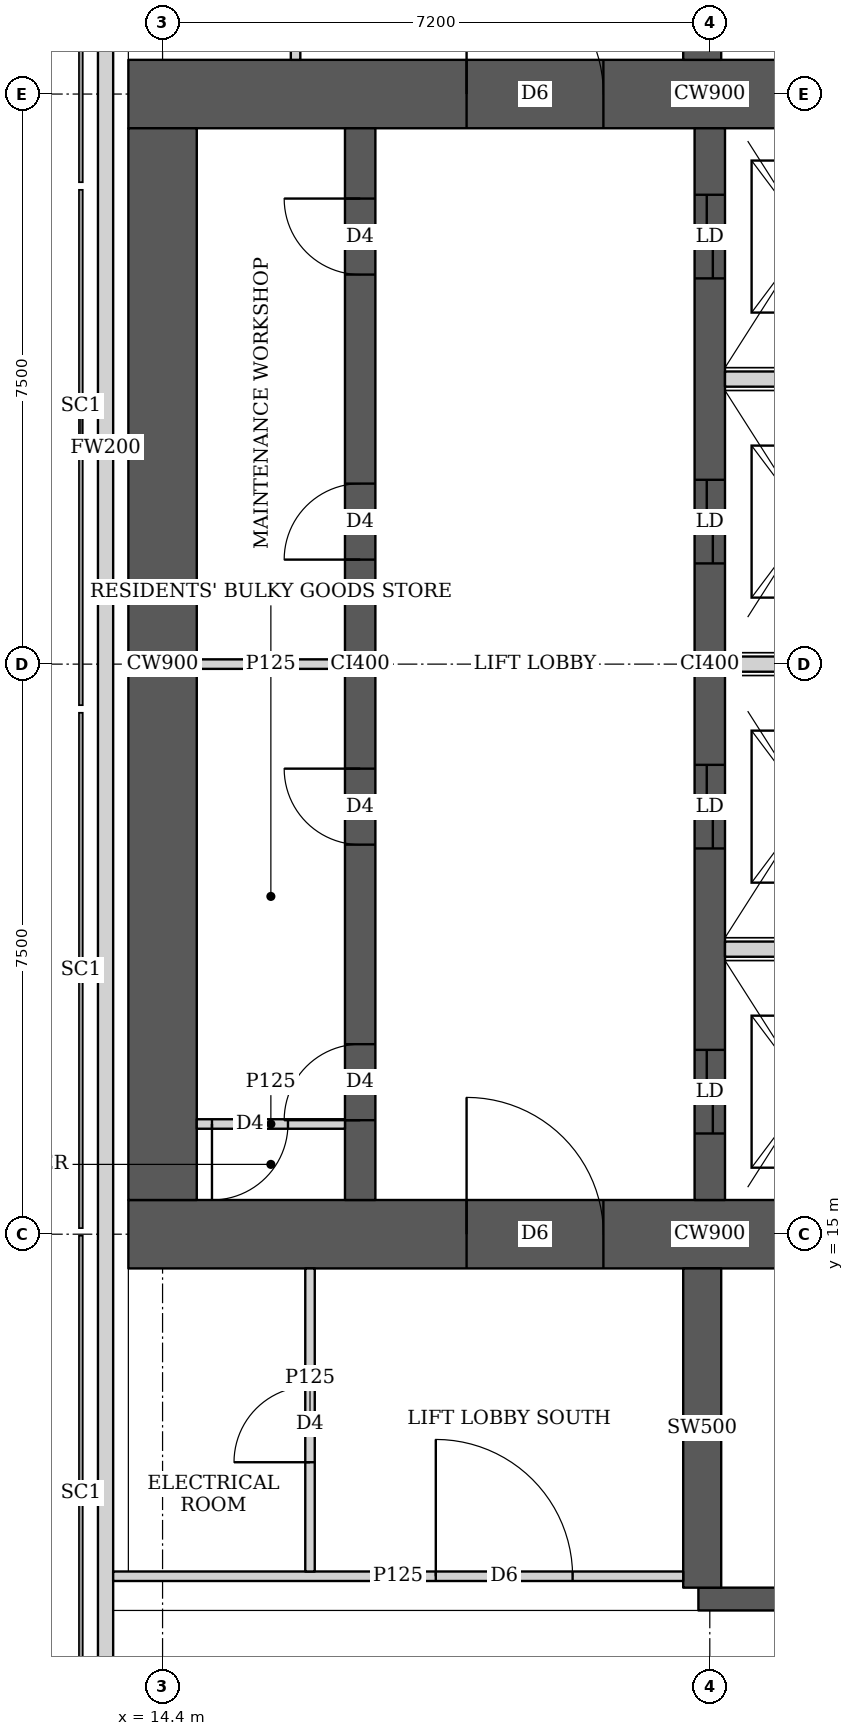
"""IFC4 building model, lengths in metres.
Left out: names, types, materials, properties, quantities, classifications, styles, units other than length and angle.
Written with IfcOpenShell. Run it as: python <this file> out.ifc"""

import sys

from ifc_helpers import new_model, si_unit, direction, frame, frame_2d, origin, place, context, subcontext, project, spatial, rectangle, extrude, element, fill, save


model = new_model("IFC4")
c1 = context("Model", 3, precision=1e-05, world=origin(), true_north=direction((0.0, 1.0)))
c2 = subcontext(c1, "Body", "Model", "MODEL_VIEW")
j1 = project(units=[si_unit("LENGTHUNIT", "METRE"), si_unit("PLANEANGLEUNIT", "RADIAN")], contexts=[c1])
p1 = place(None, origin())
s1 = spatial("IfcSite", under=j1, at=p1, CompositionType="ELEMENT")
p2 = place(p1, origin())
s2 = spatial("IfcBuilding", under=s1, at=p2, CompositionType="ELEMENT")
p3 = place(p2, frame((0.0, 0.0, 277.85)))
s3 = spatial("IfcBuildingStorey", under=s2, at=p3, CompositionType="ELEMENT", Elevation=277.85)
p4 = place(p3, frame((13.95, 15.0, 0.0), z_axis=(0.0, 0.0, 1.0), x_axis=(1.0, 0.0, 0.0)))
e1 = element("IfcWall", 1, at=p4, inside=s3, PredefinedType="SHEAR", context=c2, shape_type="SweptSolid", body=[
    extrude(rectangle(XDim=15.3, YDim=0.9, at=frame_2d((7.65, 0.0))), origin(), (0.0, 0.0, 1.0), 3.75),
])
p5 = place(p4, frame((4.45, 0.0, 0.0)))
e2 = element("IfcOpeningElement", 2, at=p5, cuts=e1, PredefinedType="OPENING", context=c2, shape_type="SweptSolid", body=[
    extrude(rectangle(XDim=1.8, YDim=2.1, at=frame_2d((0.9, 1.05))), frame((0.0, 0.46, 0.0), z_axis=(0.0, -1.0, 0.0), x_axis=(1.0, 0.0, 0.0)), (0.0, 0.0, 1.0), 0.92),
])
p6 = place(p4, frame((10.7, 0.0, 0.0)))
e3 = element("IfcOpeningElement", 3, at=p6, cuts=e1, PredefinedType="OPENING", context=c2, shape_type="SweptSolid", body=[
    extrude(rectangle(XDim=1.1, YDim=2.1, at=frame_2d((0.55, 1.05))), frame((0.0, 0.46, 0.0), z_axis=(0.0, -1.0, 0.0), x_axis=(1.0, 0.0, 0.0)), (0.0, 0.0, 1.0), 0.92),
])
p7 = place(p3, frame((13.95, 30.0, 0.0), z_axis=(0.0, 0.0, 1.0), x_axis=(1.0, 0.0, 0.0)))
e4 = element("IfcWall", 4, at=p7, inside=s3, PredefinedType="SHEAR", context=c2, shape_type="SweptSolid", body=[
    extrude(rectangle(XDim=15.3, YDim=0.9, at=frame_2d((7.65, 0.0))), origin(), (0.0, 0.0, 1.0), 3.75),
])
p8 = place(p7, frame((4.45, 0.0, 0.0)))
e5 = element("IfcOpeningElement", 5, at=p8, cuts=e4, PredefinedType="OPENING", context=c2, shape_type="SweptSolid", body=[
    extrude(rectangle(XDim=1.8, YDim=2.1, at=frame_2d((0.9, 1.05))), frame((0.0, 0.46, 0.0), z_axis=(0.0, -1.0, 0.0), x_axis=(1.0, 0.0, 0.0)), (0.0, 0.0, 1.0), 0.92),
])
p9 = place(p7, frame((10.7, 0.0, 0.0)))
e6 = element("IfcOpeningElement", 6, at=p9, cuts=e4, PredefinedType="OPENING", context=c2, shape_type="SweptSolid", body=[
    extrude(rectangle(XDim=1.1, YDim=2.1, at=frame_2d((0.55, 1.05))), frame((0.0, 0.46, 0.0), z_axis=(0.0, -1.0, 0.0), x_axis=(1.0, 0.0, 0.0)), (0.0, 0.0, 1.0), 0.92),
])
p10 = place(p3, frame((14.4, 15.45, 0.0), z_axis=(0.0, 0.0, 1.0), x_axis=(0.0, 1.0, 0.0)))
e7 = element("IfcWall", 7, at=p10, inside=s3, PredefinedType="SHEAR", context=c2, shape_type="SweptSolid", body=[
    extrude(rectangle(XDim=14.1, YDim=0.9, at=frame_2d((7.05, 0.0))), origin(), (0.0, 0.0, 1.0), 3.75),
])
p11 = place(p3, frame((17.0, 15.45, 0.0), z_axis=(0.0, 0.0, 1.0), x_axis=(0.0, 1.0, 0.0)))
e8 = element("IfcWall", 8, at=p11, inside=s3, PredefinedType="SHEAR", context=c2, shape_type="SweptSolid", body=[
    extrude(rectangle(XDim=14.1, YDim=0.4, at=frame_2d((7.05, 0.0))), origin(), (0.0, 0.0, 1.0), 3.75),
])
p12 = place(p11, frame((1.05, 0.0, 0.0)))
e9 = element("IfcOpeningElement", 9, at=p12, cuts=e8, PredefinedType="OPENING", context=c2, shape_type="SweptSolid", body=[
    extrude(rectangle(XDim=1.0, YDim=2.1, at=frame_2d((0.5, 1.05))), frame((0.0, 0.21, 0.0), z_axis=(0.0, -1.0, 0.0), x_axis=(1.0, 0.0, 0.0)), (0.0, 0.0, 1.0), 0.42),
])
p13 = place(p11, frame((4.675, 0.0, 0.0)))
e10 = element("IfcOpeningElement", 10, at=p13, cuts=e8, PredefinedType="OPENING", context=c2, shape_type="SweptSolid", body=[
    extrude(rectangle(XDim=1.0, YDim=2.1, at=frame_2d((0.5, 1.05))), frame((0.0, 0.21, 0.0), z_axis=(0.0, -1.0, 0.0), x_axis=(1.0, 0.0, 0.0)), (0.0, 0.0, 1.0), 0.42),
])
p14 = place(p11, frame((8.425, 0.0, 0.0)))
e11 = element("IfcOpeningElement", 11, at=p14, cuts=e8, PredefinedType="OPENING", context=c2, shape_type="SweptSolid", body=[
    extrude(rectangle(XDim=1.0, YDim=2.1, at=frame_2d((0.5, 1.05))), frame((0.0, 0.21, 0.0), z_axis=(0.0, -1.0, 0.0), x_axis=(1.0, 0.0, 0.0)), (0.0, 0.0, 1.0), 0.42),
])
p15 = place(p11, frame((12.175, 0.0, 0.0)))
e12 = element("IfcOpeningElement", 12, at=p15, cuts=e8, PredefinedType="OPENING", context=c2, shape_type="SweptSolid", body=[
    extrude(rectangle(XDim=1.0, YDim=2.1, at=frame_2d((0.5, 1.05))), frame((0.0, 0.21, 0.0), z_axis=(0.0, -1.0, 0.0), x_axis=(1.0, 0.0, 0.0)), (0.0, 0.0, 1.0), 0.42),
])
p16 = place(p3, frame((21.6, 15.45, 0.0), z_axis=(0.0, 0.0, 1.0), x_axis=(0.0, 1.0, 0.0)))
e13 = element("IfcWall", 13, at=p16, inside=s3, PredefinedType="SHEAR", context=c2, shape_type="SweptSolid", body=[
    extrude(rectangle(XDim=14.1, YDim=0.4, at=frame_2d((7.05, 0.0))), origin(), (0.0, 0.0, 1.0), 3.75),
])
p17 = place(p16, frame((0.875, 0.0, 0.0)))
e14 = element("IfcOpeningElement", 14, at=p17, cuts=e13, PredefinedType="OPENING", context=c2, shape_type="SweptSolid", body=[
    extrude(rectangle(XDim=1.1, YDim=2.1, at=frame_2d((0.55, 1.05))), frame((0.0, 0.21, 0.0), z_axis=(0.0, -1.0, 0.0), x_axis=(1.0, 0.0, 0.0)), (0.0, 0.0, 1.0), 0.42),
])
p18 = place(p16, frame((4.625, 0.0, 0.0)))
e15 = element("IfcOpeningElement", 15, at=p18, cuts=e13, PredefinedType="OPENING", context=c2, shape_type="SweptSolid", body=[
    extrude(rectangle(XDim=1.1, YDim=2.1, at=frame_2d((0.55, 1.05))), frame((0.0, 0.21, 0.0), z_axis=(0.0, -1.0, 0.0), x_axis=(1.0, 0.0, 0.0)), (0.0, 0.0, 1.0), 0.42),
])
p19 = place(p16, frame((8.375, 0.0, 0.0)))
e16 = element("IfcOpeningElement", 16, at=p19, cuts=e13, PredefinedType="OPENING", context=c2, shape_type="SweptSolid", body=[
    extrude(rectangle(XDim=1.1, YDim=2.1, at=frame_2d((0.55, 1.05))), frame((0.0, 0.21, 0.0), z_axis=(0.0, -1.0, 0.0), x_axis=(1.0, 0.0, 0.0)), (0.0, 0.0, 1.0), 0.42),
])
p20 = place(p16, frame((12.125, 0.0, 0.0)))
e17 = element("IfcOpeningElement", 17, at=p20, cuts=e13, PredefinedType="OPENING", context=c2, shape_type="SweptSolid", body=[
    extrude(rectangle(XDim=1.1, YDim=2.1, at=frame_2d((0.55, 1.05))), frame((0.0, 0.21, 0.0), z_axis=(0.0, -1.0, 0.0), x_axis=(1.0, 0.0, 0.0)), (0.0, 0.0, 1.0), 0.42),
])
p21 = place(p3, frame((21.45, 10.2, 0.0), z_axis=(0.0, 0.0, 1.0), x_axis=(1.0, 0.0, 0.0)))
e18 = element("IfcWall", 18, at=p21, inside=s3, PredefinedType="SHEAR", context=c2, shape_type="SweptSolid", body=[
    extrude(rectangle(XDim=7.5, YDim=0.3, at=frame_2d((3.75, 0.0))), origin(), (0.0, 0.0, 1.0), 3.75),
])
p22 = place(p21, frame((1.2, 0.0, 0.0)))
e19 = element("IfcOpeningElement", 19, at=p22, cuts=e18, PredefinedType="OPENING", context=c2, shape_type="SweptSolid", body=[
    extrude(rectangle(XDim=1.1, YDim=2.1, at=frame_2d((0.55, 1.05))), frame((0.0, 0.16, 0.0), z_axis=(0.0, -1.0, 0.0), x_axis=(1.0, 0.0, 0.0)), (0.0, 0.0, 1.0), 0.32),
])
for number, where, z_axis, x_axis in (
    (20, (21.5, 10.35, 0.0), (0.0, 0.0, 1.0), (0.0, 1.0, 0.0)),
    (21, (21.5, 30.45, 0.0), (0.0, 0.0, 1.0), (0.0, 1.0, 0.0)),
):
    element("IfcWall", number, at=place(p3, frame(where, z_axis=z_axis, x_axis=x_axis)), inside=s3, PredefinedType="SHEAR", context=c2, shape_type="SweptSolid", body=[
        extrude(rectangle(XDim=4.2, YDim=0.5, at=frame_2d((2.1, 0.0))), origin(), (0.0, 0.0, 1.0), 3.75),
    ])
p23 = place(p3, frame((13.65, 43.037, 0.0), z_axis=(0.0, 0.0, 1.0), x_axis=(0.0, -1.0, 0.0)))
e22 = element("IfcWall", 22, at=p23, inside=s3, PredefinedType="SOLIDWALL", context=c2, shape_type="SweptSolid", body=[
    extrude(rectangle(XDim=35.374, YDim=0.2, at=frame_2d((17.687, 0.0))), origin(), (0.0, 0.0, 1.0), 3.5),
])
p24 = place(p23, frame((1.959, 0.0, 0.9)))
e23 = element("IfcOpeningElement", 23, at=p24, cuts=e22, PredefinedType="OPENING", context=c2, shape_type="SweptSolid", body=[
    extrude(rectangle(XDim=1.8, YDim=1.5, at=frame_2d((0.9, 0.75))), frame((0.0, 0.11, 0.0), z_axis=(0.0, -1.0, 0.0), x_axis=(1.0, 0.0, 0.0)), (0.0, 0.0, 1.0), 0.22),
])
p25 = place(p3, frame((13.75, 10.5, 0.0), z_axis=(0.0, 0.0, 1.0), x_axis=(1.0, 0.0, 0.0)))
e24 = element("IfcWall", 24, at=p25, inside=s3, PredefinedType="PARTITIONING", context=c2, shape_type="SweptSolid", body=[
    extrude(rectangle(XDim=7.5, YDim=0.125, at=frame_2d((3.75, 0.0))), origin(), (0.0, 0.0, 1.0), 3.5),
])
p26 = place(p25, frame((4.245, 0.0, 0.0)))
e25 = element("IfcOpeningElement", 25, at=p26, cuts=e24, PredefinedType="OPENING", context=c2, shape_type="SweptSolid", body=[
    extrude(rectangle(XDim=1.8, YDim=2.1, at=frame_2d((0.9, 1.05))), frame((0.0, 0.073, 0.0), z_axis=(0.0, -1.0, 0.0), x_axis=(1.0, 0.0, 0.0)), (0.0, 0.0, 1.0), 0.145),
])
p27 = place(p3, frame((16.34, 10.562, 0.0), z_axis=(0.0, 0.0, 1.0), x_axis=(0.0, 1.0, 0.0)))
e26 = element("IfcWall", 26, at=p27, inside=s3, PredefinedType="PARTITIONING", context=c2, shape_type="SweptSolid", body=[
    extrude(rectangle(XDim=3.988, YDim=0.125, at=frame_2d((1.994, 0.0))), origin(), (0.0, 0.0, 1.0), 3.5),
])
p28 = place(p27, frame((1.438, 0.0, 0.0)))
e27 = element("IfcOpeningElement", 27, at=p28, cuts=e26, PredefinedType="OPENING", context=c2, shape_type="SweptSolid", body=[
    extrude(rectangle(XDim=1.0, YDim=2.1, at=frame_2d((0.5, 1.05))), frame((0.0, 0.073, 0.0), z_axis=(0.0, -1.0, 0.0), x_axis=(1.0, 0.0, 0.0)), (0.0, 0.0, 1.0), 0.145),
])
p29 = place(p3, frame((16.15, 30.45, 0.0), z_axis=(0.0, 0.0, 1.0), x_axis=(0.0, 1.0, 0.0)))
e28 = element("IfcWall", 28, at=p29, inside=s3, PredefinedType="PARTITIONING", context=c2, shape_type="SweptSolid", body=[
    extrude(rectangle(XDim=4.387, YDim=0.125, at=frame_2d((2.193, 0.0))), origin(), (0.0, 0.0, 1.0), 3.5),
])
p30 = place(p29, frame((1.75, 0.0, 0.0)))
e29 = element("IfcOpeningElement", 29, at=p30, cuts=e28, PredefinedType="OPENING", context=c2, shape_type="SweptSolid", body=[
    extrude(rectangle(XDim=1.0, YDim=2.1, at=frame_2d((0.5, 1.05))), frame((0.0, 0.073, 0.0), z_axis=(0.0, -1.0, 0.0), x_axis=(1.0, 0.0, 0.0)), (0.0, 0.0, 1.0), 0.145),
])
p31 = place(p3, frame((14.85, 16.45, 0.0), z_axis=(0.0, 0.0, 1.0), x_axis=(1.0, 0.0, 0.0)))
e30 = element("IfcWall", 30, at=p31, inside=s3, PredefinedType="PARTITIONING", context=c2, shape_type="SweptSolid", body=[
    extrude(rectangle(XDim=1.95, YDim=0.125, at=frame_2d((0.975, 0.0))), origin(), (0.0, 0.0, 1.0), 3.5),
])
p32 = place(p31, frame((0.2, 0.0, 0.0)))
e31 = element("IfcOpeningElement", 31, at=p32, cuts=e30, PredefinedType="OPENING", context=c2, shape_type="SweptSolid", body=[
    extrude(rectangle(XDim=1.0, YDim=2.1, at=frame_2d((0.5, 1.05))), frame((0.0, 0.073, 0.0), z_axis=(0.0, -1.0, 0.0), x_axis=(1.0, 0.0, 0.0)), (0.0, 0.0, 1.0), 0.145),
])
p33 = place(p3, frame((14.85, 22.5, 0.0), z_axis=(0.0, 0.0, 1.0), x_axis=(1.0, 0.0, 0.0)))
e32 = element("IfcWall", 32, at=p33, inside=s3, PredefinedType="PARTITIONING", context=c2, shape_type="SweptSolid", body=[
    extrude(rectangle(XDim=1.95, YDim=0.125, at=frame_2d((0.975, 0.0))), origin(), (0.0, 0.0, 1.0), 3.5),
])
for number, where, z_axis, x_axis in (
    (33, (21.8, 18.75, 0.0), (0.0, 0.0, 1.0), (1.0, 0.0, 0.0)),
    (34, (21.8, 22.5, 0.0), (0.0, 0.0, 1.0), (1.0, 0.0, 0.0)),
    (35, (21.8, 26.25, 0.0), (0.0, 0.0, 1.0), (1.0, 0.0, 0.0)),
):
    element("IfcWall", number, at=place(p3, frame(where, z_axis=z_axis, x_axis=x_axis)), inside=s3, PredefinedType="SOLIDWALL", context=c2, shape_type="SweptSolid", body=[
        extrude(rectangle(XDim=2.2, YDim=0.2, at=frame_2d((1.1, 0.0))), origin(), (0.0, 0.0, 1.0), 3.5),
    ])
p34 = place(p28, origin())
e36 = element("IfcDoor", 36, at=p34, inside=s3, OperationType="SINGLE_SWING_LEFT", PredefinedType="DOOR", context=c2, shape_type="SweptSolid", body=[
    extrude(rectangle(XDim=1.0, YDim=2.1, at=frame_2d((0.5, 1.05))), frame((0.0, 0.025, 0.0), z_axis=(0.0, -1.0, 0.0), x_axis=(1.0, 0.0, 0.0)), (0.0, 0.0, 1.0), 0.05),
])
fill(e27, e36)
p35 = place(p26, origin())
e37 = element("IfcDoor", 37, at=p35, inside=s3, OperationType="DOUBLE_DOOR_SINGLE_SWING", PredefinedType="DOOR", context=c2, shape_type="SweptSolid", body=[
    extrude(rectangle(XDim=1.8, YDim=2.1, at=frame_2d((0.9, 1.05))), frame((0.0, 0.025, 0.0), z_axis=(0.0, -1.0, 0.0), x_axis=(1.0, 0.0, 0.0)), (0.0, 0.0, 1.0), 0.05),
])
fill(e25, e37)
p36 = place(p32, origin())
e38 = element("IfcDoor", 38, at=p36, inside=s3, OperationType="SINGLE_SWING_RIGHT", PredefinedType="DOOR", context=c2, shape_type="SweptSolid", body=[
    extrude(rectangle(XDim=1.0, YDim=2.1, at=frame_2d((0.5, 1.05))), frame((0.0, 0.025, 0.0), z_axis=(0.0, -1.0, 0.0), x_axis=(1.0, 0.0, 0.0)), (0.0, 0.0, 1.0), 0.05),
])
fill(e31, e38)
p37 = place(p12, origin())
e39 = element("IfcDoor", 39, at=p37, inside=s3, OperationType="SINGLE_SWING_LEFT", PredefinedType="DOOR", context=c2, shape_type="SweptSolid", body=[
    extrude(rectangle(XDim=1.0, YDim=2.1, at=frame_2d((0.5, 1.05))), frame((0.0, 0.025, 0.0), z_axis=(0.0, -1.0, 0.0), x_axis=(1.0, 0.0, 0.0)), (0.0, 0.0, 1.0), 0.05),
])
fill(e9, e39)
p38 = place(p13, origin())
e40 = element("IfcDoor", 40, at=p38, inside=s3, OperationType="SINGLE_SWING_RIGHT", PredefinedType="DOOR", context=c2, shape_type="SweptSolid", body=[
    extrude(rectangle(XDim=1.0, YDim=2.1, at=frame_2d((0.5, 1.05))), frame((0.0, 0.025, 0.0), z_axis=(0.0, -1.0, 0.0), x_axis=(1.0, 0.0, 0.0)), (0.0, 0.0, 1.0), 0.05),
])
fill(e10, e40)
p39 = place(p14, origin())
e41 = element("IfcDoor", 41, at=p39, inside=s3, OperationType="SINGLE_SWING_LEFT", PredefinedType="DOOR", context=c2, shape_type="SweptSolid", body=[
    extrude(rectangle(XDim=1.0, YDim=2.1, at=frame_2d((0.5, 1.05))), frame((0.0, 0.025, 0.0), z_axis=(0.0, -1.0, 0.0), x_axis=(1.0, 0.0, 0.0)), (0.0, 0.0, 1.0), 0.05),
])
fill(e11, e41)
p40 = place(p15, origin())
e42 = element("IfcDoor", 42, at=p40, inside=s3, OperationType="SINGLE_SWING_RIGHT", PredefinedType="DOOR", context=c2, shape_type="SweptSolid", body=[
    extrude(rectangle(XDim=1.0, YDim=2.1, at=frame_2d((0.5, 1.05))), frame((0.0, 0.025, 0.0), z_axis=(0.0, -1.0, 0.0), x_axis=(1.0, 0.0, 0.0)), (0.0, 0.0, 1.0), 0.05),
])
fill(e12, e42)
p41 = place(p5, origin())
e43 = element("IfcDoor", 43, at=p41, inside=s3, OperationType="DOUBLE_DOOR_SINGLE_SWING", PredefinedType="DOOR", context=c2, shape_type="SweptSolid", body=[
    extrude(rectangle(XDim=1.8, YDim=2.1, at=frame_2d((0.9, 1.05))), frame((0.0, 0.025, 0.0), z_axis=(0.0, -1.0, 0.0), x_axis=(1.0, 0.0, 0.0)), (0.0, 0.0, 1.0), 0.05),
])
fill(e2, e43)
p42 = place(p8, origin())
e44 = element("IfcDoor", 44, at=p42, inside=s3, OperationType="DOUBLE_DOOR_SINGLE_SWING", PredefinedType="DOOR", context=c2, shape_type="SweptSolid", body=[
    extrude(rectangle(XDim=1.8, YDim=2.1, at=frame_2d((0.9, 1.05))), frame((0.0, 0.025, 0.0), z_axis=(0.0, -1.0, 0.0), x_axis=(1.0, 0.0, 0.0)), (0.0, 0.0, 1.0), 0.05),
])
fill(e5, e44)
p43 = place(p17, origin())
e45 = element("IfcDoor", 45, at=p43, inside=s3, OperationType="DOUBLE_DOOR_SLIDING", PredefinedType="DOOR", context=c2, shape_type="SweptSolid", body=[
    extrude(rectangle(XDim=1.1, YDim=2.1, at=frame_2d((0.55, 1.05))), frame((0.0, 0.025, 0.0), z_axis=(0.0, -1.0, 0.0), x_axis=(1.0, 0.0, 0.0)), (0.0, 0.0, 1.0), 0.05),
])
fill(e14, e45)
p44 = place(p18, origin())
e46 = element("IfcDoor", 46, at=p44, inside=s3, OperationType="DOUBLE_DOOR_SLIDING", PredefinedType="DOOR", context=c2, shape_type="SweptSolid", body=[
    extrude(rectangle(XDim=1.1, YDim=2.1, at=frame_2d((0.55, 1.05))), frame((0.0, 0.025, 0.0), z_axis=(0.0, -1.0, 0.0), x_axis=(1.0, 0.0, 0.0)), (0.0, 0.0, 1.0), 0.05),
])
fill(e15, e46)
p45 = place(p19, origin())
e47 = element("IfcDoor", 47, at=p45, inside=s3, OperationType="DOUBLE_DOOR_SLIDING", PredefinedType="DOOR", context=c2, shape_type="SweptSolid", body=[
    extrude(rectangle(XDim=1.1, YDim=2.1, at=frame_2d((0.55, 1.05))), frame((0.0, 0.025, 0.0), z_axis=(0.0, -1.0, 0.0), x_axis=(1.0, 0.0, 0.0)), (0.0, 0.0, 1.0), 0.05),
])
fill(e16, e47)
p46 = place(p20, origin())
e48 = element("IfcDoor", 48, at=p46, inside=s3, OperationType="DOUBLE_DOOR_SLIDING", PredefinedType="DOOR", context=c2, shape_type="SweptSolid", body=[
    extrude(rectangle(XDim=1.1, YDim=2.1, at=frame_2d((0.55, 1.05))), frame((0.0, 0.025, 0.0), z_axis=(0.0, -1.0, 0.0), x_axis=(1.0, 0.0, 0.0)), (0.0, 0.0, 1.0), 0.05),
])
fill(e17, e48)
save(model, sys.argv[1])
